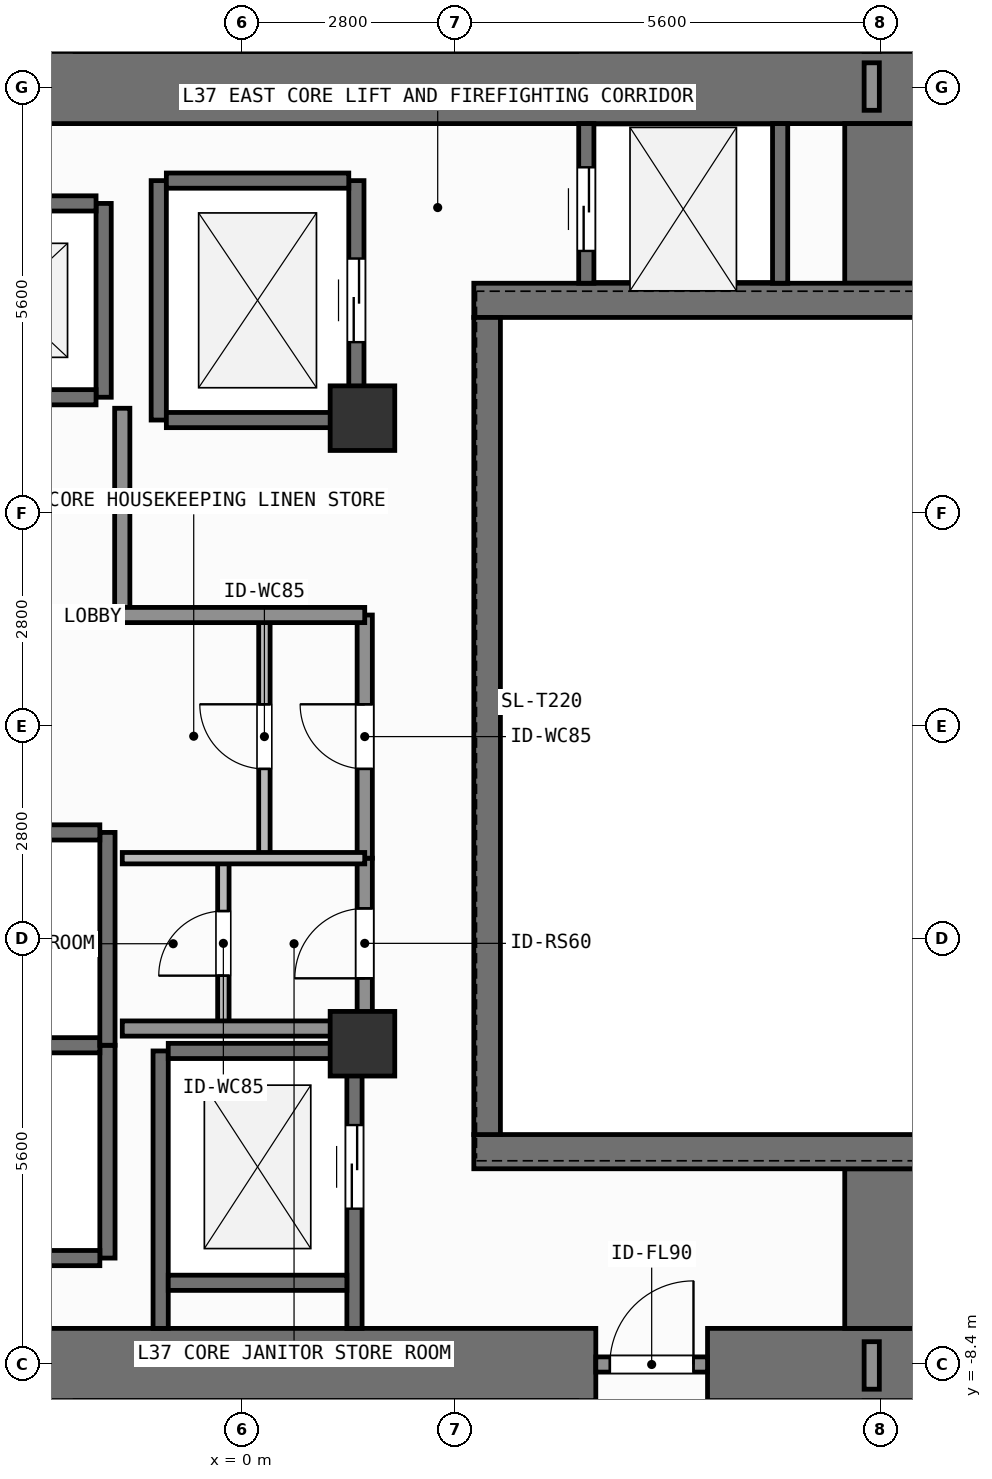
"""IFC4 building model, lengths in metres.
Left out: names, types, materials, properties, quantities, classifications, styles, units other than length and angle.
Written with IfcOpenShell. Run it as: python <this file> out.ifc"""

import sys

from ifc_helpers import new_model, si_unit, direction, frame, frame_2d, origin, origin_2d, place, context, subcontext, project, spatial, rectangle, extrude, element, fill, save


model = new_model("IFC4")
c1 = context("Model", 3, precision=1e-05, world=origin(), true_north=direction((0.0, 1.0)))
c2 = subcontext(c1, "Body", "Model", "MODEL_VIEW")
j1 = project(units=[si_unit("LENGTHUNIT", "METRE"), si_unit("PLANEANGLEUNIT", "RADIAN")], contexts=[c1])
p1 = place(None, origin())
s1 = spatial("IfcSite", under=j1, at=p1, CompositionType="ELEMENT")
p2 = place(p1, origin())
s2 = spatial("IfcBuilding", under=s1, at=p2, CompositionType="ELEMENT")
p3 = place(p2, frame((0.0, 0.0, 148.5)))
s3 = spatial("IfcBuildingStorey", under=s2, at=p3, CompositionType="ELEMENT", Elevation=148.5)
p4 = place(p3, frame((-2.62, -8.4, 0.0), z_axis=(0.0, 0.0, 1.0), x_axis=(1.0, 0.0, 0.0)))
e1 = element("IfcWall", 1, at=p4, inside=s3, PredefinedType="SHEAR", context=c2, shape_type="SweptSolid", body=[
    extrude(rectangle(XDim=7.27, YDim=0.95, at=frame_2d((3.635, 0.0))), origin(), (0.0, 0.0, 1.0), 3.9),
])
p5 = place(p3, frame((6.12, -8.4, 0.0), z_axis=(0.0, 0.0, 1.0), x_axis=(1.0, 0.0, 0.0)))
e2 = element("IfcWall", 2, at=p5, inside=s3, PredefinedType="SHEAR", context=c2, shape_type="SweptSolid", body=[
    extrude(rectangle(XDim=2.755, YDim=0.95, at=frame_2d((1.377, 0.0))), origin(), (0.0, 0.0, 1.0), 3.9),
])
p6 = place(p3, frame((-7.55, 8.4, 0.0), z_axis=(0.0, 0.0, 1.0), x_axis=(1.0, 0.0, 0.0)))
e3 = element("IfcWall", 3, at=p6, inside=s3, PredefinedType="SHEAR", context=c2, shape_type="SweptSolid", body=[
    extrude(rectangle(XDim=16.425, YDim=0.95, at=frame_2d((8.212, 0.0))), origin(), (0.0, 0.0, 1.0), 3.9),
])
for number, where, z_axis, x_axis in (
    (4, (8.4, -7.925, 0.0), (0.0, 0.0, 1.0), (0.0, 1.0, 0.0)),
    (5, (8.4, 5.825, 0.0), (0.0, 0.0, 1.0), (0.0, 1.0, 0.0)),
):
    element("IfcWall", number, at=place(p3, frame(where, z_axis=z_axis, x_axis=x_axis)), inside=s3, PredefinedType="SHEAR", context=c2, shape_type="SweptSolid", body=[
        extrude(rectangle(XDim=2.1, YDim=0.95, at=frame_2d((1.05, 0.0))), origin(), (0.0, 0.0, 1.0), 3.9),
    ])
for number, where, z_axis, x_axis in (
    (6, (3.045, -5.6, 0.0), (0.0, 0.0, 1.0), (1.0, 0.0, 0.0)),
    (7, (3.045, 5.6, 0.0), (0.0, 0.0, 1.0), (1.0, 0.0, 0.0)),
):
    element("IfcWall", number, at=place(p3, frame(where, z_axis=z_axis, x_axis=x_axis)), inside=s3, PredefinedType="SHEAR", context=c2, shape_type="SweptSolid", body=[
        extrude(rectangle(XDim=5.83, YDim=0.45, at=frame_2d((2.915, 0.0))), origin(), (0.0, 0.0, 1.0), 3.9),
    ])
p7 = place(p3, frame((3.22, -5.375, 0.0), z_axis=(0.0, 0.0, 1.0), x_axis=(0.0, 1.0, 0.0)))
e8 = element("IfcWall", 8, at=p7, inside=s3, PredefinedType="SHEAR", context=c2, shape_type="SweptSolid", body=[
    extrude(rectangle(XDim=10.75, YDim=0.35, at=frame_2d((5.375, 0.0))), origin(), (0.0, 0.0, 1.0), 3.9),
])
for number, where, z_axis, x_axis in (
    (9, (1.58, -4.18, 0.0), (0.0, 0.0, 1.0), (1.0, 0.0, 0.0)),
    (10, (1.58, 4.05, 0.0), (0.0, 0.0, 1.0), (1.0, 0.0, 0.0)),
):
    element("IfcColumn", number, at=place(p3, frame(where, z_axis=z_axis, x_axis=x_axis)), inside=s3, PredefinedType="COLUMN", context=c2, shape_type="SweptSolid", body=[
        extrude(rectangle(XDim=0.85, YDim=0.85, at=origin_2d()), origin(), (0.0, 0.0, 1.0), 3.9),
    ])
p8 = place(p3, frame((-1.825, 4.325, 0.0), z_axis=(0.0, 0.0, 1.0), x_axis=(0.0, 1.0, 0.0)))
e11 = element("IfcWall", 11, at=p8, inside=s3, PredefinedType="SHEAR", context=c2, shape_type="SweptSolid", body=[
    extrude(rectangle(XDim=2.55, YDim=0.2, at=frame_2d((1.275, 0.0))), origin(), (0.0, 0.0, 1.0), 3.68),
])
p9 = place(p3, frame((-4.275, 4.325, 0.0), z_axis=(0.0, 0.0, 1.0), x_axis=(1.0, 0.0, 0.0)))
e12 = element("IfcWall", 12, at=p9, inside=s3, PredefinedType="SHEAR", context=c2, shape_type="SweptSolid", body=[
    extrude(rectangle(XDim=2.35, YDim=0.2, at=frame_2d((1.175, 0.0))), origin(), (0.0, 0.0, 1.0), 3.68),
])
p10 = place(p9, frame((0.625, 0.0, 0.0)))
e13 = element("IfcOpeningElement", 13, at=p10, cuts=e12, PredefinedType="OPENING", context=c2, shape_type="SweptSolid", body=[
    extrude(rectangle(XDim=1.1, YDim=2.2, at=frame_2d((0.55, 1.1))), frame((0.0, 0.11, 0.0), z_axis=(0.0, -1.0, 0.0), x_axis=(1.0, 0.0, 0.0)), (0.0, 0.0, 1.0), 0.22),
])
p11 = place(p3, frame((-4.275, 6.875, 0.0), z_axis=(0.0, 0.0, 1.0), x_axis=(1.0, 0.0, 0.0)))
e14 = element("IfcWall", 14, at=p11, inside=s3, PredefinedType="SHEAR", context=c2, shape_type="SweptSolid", body=[
    extrude(rectangle(XDim=2.35, YDim=0.2, at=frame_2d((1.175, 0.0))), origin(), (0.0, 0.0, 1.0), 3.68),
])
p12 = place(p3, frame((-1.775, -7.0, 0.0), z_axis=(0.0, 0.0, 1.0), x_axis=(0.0, 1.0, 0.0)))
e15 = element("IfcWall", 15, at=p12, inside=s3, PredefinedType="SHEAR", context=c2, shape_type="SweptSolid", body=[
    extrude(rectangle(XDim=2.8, YDim=0.2, at=frame_2d((1.4, 0.0))), origin(), (0.0, 0.0, 1.0), 3.68),
])
for number, where, z_axis, x_axis in (
    (16, (-4.325, -7.0, 0.0), (0.0, 0.0, 1.0), (1.0, 0.0, 0.0)),
    (17, (-4.325, -4.2, 0.0), (0.0, 0.0, 1.0), (1.0, 0.0, 0.0)),
):
    element("IfcWall", number, at=place(p3, frame(where, z_axis=z_axis, x_axis=x_axis)), inside=s3, PredefinedType="SHEAR", context=c2, shape_type="SweptSolid", body=[
        extrude(rectangle(XDim=2.45, YDim=0.2, at=frame_2d((1.225, 0.0))), origin(), (0.0, 0.0, 1.0), 3.68),
    ])
p13 = place(p3, frame((-1.775, -4.2, 0.0), z_axis=(0.0, 0.0, 1.0), x_axis=(0.0, 1.0, 0.0)))
e18 = element("IfcWall", 18, at=p13, inside=s3, PredefinedType="SHEAR", context=c2, shape_type="SweptSolid", body=[
    extrude(rectangle(XDim=2.8, YDim=0.2, at=frame_2d((1.4, 0.0))), origin(), (0.0, 0.0, 1.0), 3.68),
])
p14 = place(p3, frame((-4.325, -1.4, 0.0), z_axis=(0.0, 0.0, 1.0), x_axis=(1.0, 0.0, 0.0)))
e19 = element("IfcWall", 19, at=p14, inside=s3, PredefinedType="SHEAR", context=c2, shape_type="SweptSolid", body=[
    extrude(rectangle(XDim=2.45, YDim=0.2, at=frame_2d((1.225, 0.0))), origin(), (0.0, 0.0, 1.0), 3.68),
])
p15 = place(p3, frame((-1.1, 4.025, 0.0), z_axis=(0.0, 0.0, 1.0), x_axis=(0.0, 1.0, 0.0)))
e20 = element("IfcWall", 20, at=p15, inside=s3, PredefinedType="SHEAR", context=c2, shape_type="SweptSolid", body=[
    extrude(rectangle(XDim=3.15, YDim=0.2, at=frame_2d((1.575, 0.0))), origin(), (0.0, 0.0, 1.0), 3.68),
])
p16 = place(p3, frame((1.5, 4.025, 0.0), z_axis=(0.0, 0.0, 1.0), x_axis=(0.0, 1.0, 0.0)))
e21 = element("IfcWall", 21, at=p16, inside=s3, PredefinedType="SHEAR", context=c2, shape_type="SweptSolid", body=[
    extrude(rectangle(XDim=3.15, YDim=0.2, at=frame_2d((1.575, 0.0))), origin(), (0.0, 0.0, 1.0), 3.68),
])
p17 = place(p16, frame((1.025, 0.0, 0.0)))
e22 = element("IfcOpeningElement", 22, at=p17, cuts=e21, PredefinedType="OPENING", context=c2, shape_type="SweptSolid", body=[
    extrude(rectangle(XDim=1.1, YDim=2.2, at=frame_2d((0.55, 1.1))), frame((0.0, 0.11, 0.0), z_axis=(0.0, -1.0, 0.0), x_axis=(1.0, 0.0, 0.0)), (0.0, 0.0, 1.0), 0.22),
])
for number, where, z_axis, x_axis in (
    (23, (-1.0, 4.025, 0.0), (0.0, 0.0, 1.0), (1.0, 0.0, 0.0)),
    (24, (-1.0, 7.175, 0.0), (0.0, 0.0, 1.0), (1.0, 0.0, 0.0)),
):
    element("IfcWall", number, at=place(p3, frame(where, z_axis=z_axis, x_axis=x_axis)), inside=s3, PredefinedType="SHEAR", context=c2, shape_type="SweptSolid", body=[
        extrude(rectangle(XDim=2.4, YDim=0.2, at=frame_2d((1.2, 0.0))), origin(), (0.0, 0.0, 1.0), 3.68),
    ])
p18 = place(p3, frame((-1.075, -7.925, 0.0), z_axis=(0.0, 0.0, 1.0), x_axis=(0.0, 1.0, 0.0)))
e25 = element("IfcWall", 25, at=p18, inside=s3, PredefinedType="SHEAR", context=c2, shape_type="SweptSolid", body=[
    extrude(rectangle(XDim=3.65, YDim=0.2, at=frame_2d((1.825, 0.0))), origin(), (0.0, 0.0, 1.0), 3.68),
])
p19 = place(p3, frame((1.475, -7.925, 0.0), z_axis=(0.0, 0.0, 1.0), x_axis=(0.0, 1.0, 0.0)))
e26 = element("IfcWall", 26, at=p19, inside=s3, PredefinedType="SHEAR", context=c2, shape_type="SweptSolid", body=[
    extrude(rectangle(XDim=3.65, YDim=0.2, at=frame_2d((1.825, 0.0))), origin(), (0.0, 0.0, 1.0), 3.68),
])
p20 = place(p19, frame((1.575, 0.0, 0.0)))
e27 = element("IfcOpeningElement", 27, at=p20, cuts=e26, PredefinedType="OPENING", context=c2, shape_type="SweptSolid", body=[
    extrude(rectangle(XDim=1.1, YDim=2.2, at=frame_2d((0.55, 1.1))), frame((0.0, 0.11, 0.0), z_axis=(0.0, -1.0, 0.0), x_axis=(1.0, 0.0, 0.0)), (0.0, 0.0, 1.0), 0.22),
])
for number, where, z_axis, x_axis in (
    (28, (-0.975, -7.325, 0.0), (0.0, 0.0, 1.0), (1.0, 0.0, 0.0)),
    (29, (-0.975, -4.275, 0.0), (0.0, 0.0, 1.0), (1.0, 0.0, 0.0)),
):
    element("IfcWall", number, at=place(p3, frame(where, z_axis=z_axis, x_axis=x_axis)), inside=s3, PredefinedType="SHEAR", context=c2, shape_type="SweptSolid", body=[
        extrude(rectangle(XDim=2.35, YDim=0.2, at=frame_2d((1.175, 0.0))), origin(), (0.0, 0.0, 1.0), 3.68),
    ])
p21 = place(p3, frame((4.525, 5.825, 0.0), z_axis=(0.0, 0.0, 1.0), x_axis=(0.0, 1.0, 0.0)))
e30 = element("IfcWall", 30, at=p21, inside=s3, PredefinedType="SHEAR", context=c2, shape_type="SweptSolid", body=[
    extrude(rectangle(XDim=2.1, YDim=0.2, at=frame_2d((1.05, 0.0))), origin(), (0.0, 0.0, 1.0), 3.68),
])
p22 = place(p21, frame((0.425, 0.0, 0.0)))
e31 = element("IfcOpeningElement", 31, at=p22, cuts=e30, PredefinedType="OPENING", context=c2, shape_type="SweptSolid", body=[
    extrude(rectangle(XDim=1.1, YDim=2.2, at=frame_2d((0.55, 1.1))), frame((0.0, 0.11, 0.0), z_axis=(0.0, -1.0, 0.0), x_axis=(1.0, 0.0, 0.0)), (0.0, 0.0, 1.0), 0.22),
])
p23 = place(p3, frame((7.075, 5.825, 0.0), z_axis=(0.0, 0.0, 1.0), x_axis=(0.0, 1.0, 0.0)))
e32 = element("IfcWall", 32, at=p23, inside=s3, PredefinedType="SHEAR", context=c2, shape_type="SweptSolid", body=[
    extrude(rectangle(XDim=2.1, YDim=0.2, at=frame_2d((1.05, 0.0))), origin(), (0.0, 0.0, 1.0), 3.68),
])
p24 = place(p3, frame((4.65, -8.4, 0.0), z_axis=(0.0, 0.0, 1.0), x_axis=(1.0, 0.0, 0.0)))
e33 = element("IfcWall", 33, at=p24, inside=s3, PredefinedType="SOLIDWALL", context=c2, shape_type="SweptSolid", body=[
    extrude(rectangle(XDim=1.47, YDim=0.2, at=frame_2d((0.735, 0.0))), origin(), (0.0, 0.0, 1.0), 2.72),
])
p25 = place(p24, frame((0.185, 0.0, 0.0)))
e34 = element("IfcOpeningElement", 34, at=p25, cuts=e33, PredefinedType="OPENING", context=c2, shape_type="SweptSolid", body=[
    extrude(rectangle(XDim=1.1, YDim=2.15, at=frame_2d((0.55, 1.075))), frame((0.0, 0.11, 0.0), z_axis=(0.0, -1.0, 0.0), x_axis=(1.0, 0.0, 0.0)), (0.0, 0.0, 1.0), 0.22),
])
p26 = place(p3, frame((-0.25, -3.98, 0.0), z_axis=(0.0, 0.0, 1.0), x_axis=(0.0, 1.0, 0.0)))
e35 = element("IfcWall", 35, at=p26, inside=s3, PredefinedType="PARTITIONING", context=c2, shape_type="SweptSolid", body=[
    extrude(rectangle(XDim=2.241, YDim=0.15, at=frame_2d((1.121, 0.0))), origin(), (0.0, 0.0, 1.0), 3.68),
])
p27 = place(p26, frame((0.696, 0.0, 0.0)))
e36 = element("IfcOpeningElement", 36, at=p27, cuts=e35, PredefinedType="OPENING", context=c2, shape_type="SweptSolid", body=[
    extrude(rectangle(XDim=0.85, YDim=2.1, at=frame_2d((0.425, 1.05))), frame((0.0, 0.085, 0.0), z_axis=(0.0, -1.0, 0.0), x_axis=(1.0, 0.0, 0.0)), (0.0, 0.0, 1.0), 0.17),
])
p28 = place(p3, frame((0.29, -1.739, 0.0), z_axis=(0.0, 0.0, 1.0), x_axis=(0.0, 1.0, 0.0)))
e37 = element("IfcWall", 37, at=p28, inside=s3, PredefinedType="PARTITIONING", context=c2, shape_type="SweptSolid", body=[
    extrude(rectangle(XDim=3.199, YDim=0.15, at=frame_2d((1.6, 0.0))), origin(), (0.0, 0.0, 1.0), 3.68),
])
p29 = place(p28, frame((1.175, 0.0, 0.0)))
e38 = element("IfcOpeningElement", 38, at=p29, cuts=e37, PredefinedType="OPENING", context=c2, shape_type="SweptSolid", body=[
    extrude(rectangle(XDim=0.85, YDim=2.1, at=frame_2d((0.425, 1.05))), frame((0.0, 0.085, 0.0), z_axis=(0.0, -1.0, 0.0), x_axis=(1.0, 0.0, 0.0)), (0.0, 0.0, 1.0), 0.17),
])
p30 = place(p3, frame((1.61, -3.98, 0.0), z_axis=(0.0, 0.0, 1.0), x_axis=(0.0, 1.0, 0.0)))
e39 = element("IfcWall", 39, at=p30, inside=s3, PredefinedType="SOLIDWALL", context=c2, shape_type="SweptSolid", body=[
    extrude(rectangle(XDim=2.241, YDim=0.2, at=frame_2d((1.121, 0.0))), origin(), (0.0, 0.0, 1.0), 3.68),
])
p31 = place(p30, frame((0.66, 0.0, 0.0)))
e40 = element("IfcOpeningElement", 40, at=p31, cuts=e39, PredefinedType="OPENING", context=c2, shape_type="SweptSolid", body=[
    extrude(rectangle(XDim=0.92, YDim=2.1, at=frame_2d((0.46, 1.05))), frame((0.0, 0.11, 0.0), z_axis=(0.0, -1.0, 0.0), x_axis=(1.0, 0.0, 0.0)), (0.0, 0.0, 1.0), 0.22),
])
p32 = place(p3, frame((1.61, -1.739, 0.0), z_axis=(0.0, 0.0, 1.0), x_axis=(0.0, 1.0, 0.0)))
e41 = element("IfcWall", 41, at=p32, inside=s3, PredefinedType="SOLIDWALL", context=c2, shape_type="SweptSolid", body=[
    extrude(rectangle(XDim=3.199, YDim=0.2, at=frame_2d((1.6, 0.0))), origin(), (0.0, 0.0, 1.0), 3.68),
])
p33 = place(p32, frame((1.175, 0.0, 0.0)))
e42 = element("IfcOpeningElement", 42, at=p33, cuts=e41, PredefinedType="OPENING", context=c2, shape_type="SweptSolid", body=[
    extrude(rectangle(XDim=0.85, YDim=2.1, at=frame_2d((0.425, 1.05))), frame((0.0, 0.11, 0.0), z_axis=(0.0, -1.0, 0.0), x_axis=(1.0, 0.0, 0.0)), (0.0, 0.0, 1.0), 0.22),
])
p34 = place(p3, frame((-1.58, 1.48, 0.0), z_axis=(0.0, 0.0, 1.0), x_axis=(0.0, 1.0, 0.0)))
e43 = element("IfcWall", 43, at=p34, inside=s3, PredefinedType="SOLIDWALL", context=c2, shape_type="SweptSolid", body=[
    extrude(rectangle(XDim=2.7, YDim=0.2, at=frame_2d((1.35, 0.0))), origin(), (0.0, 0.0, 1.0), 3.68),
])
for number, where, z_axis, x_axis in (
    (44, (-1.58, -3.98, 0.0), (0.0, 0.0, 1.0), (1.0, 0.0, 0.0)),
    (45, (-1.58, 1.46, 0.0), (0.0, 0.0, 1.0), (1.0, 0.0, 0.0)),
):
    element("IfcWall", number, at=place(p3, frame(where, z_axis=z_axis, x_axis=x_axis)), inside=s3, PredefinedType="SOLIDWALL", context=c2, shape_type="SweptSolid", body=[
        extrude(rectangle(XDim=3.19, YDim=0.2, at=frame_2d((1.595, 0.0))), origin(), (0.0, 0.0, 1.0), 3.68),
    ])
p35 = place(p3, frame((-1.58, -1.739, 0.0), z_axis=(0.0, 0.0, 1.0), x_axis=(1.0, 0.0, 0.0)))
e46 = element("IfcWall", 46, at=p35, inside=s3, PredefinedType="PARTITIONING", context=c2, shape_type="SweptSolid", body=[
    extrude(rectangle(XDim=3.19, YDim=0.15, at=frame_2d((1.595, 0.0))), origin(), (0.0, 0.0, 1.0), 3.68),
])
for number, where, z_axis, x_axis in (
    (47, (8.28, -8.725, 0.0), (0.0, 0.0, 1.0), (0.0, 1.0, 0.0)),
    (48, (8.28, 8.1, 0.0), (0.0, 0.0, 1.0), (0.0, 1.0, 0.0)),
):
    element("IfcWall", number, at=place(p3, frame(where, z_axis=z_axis, x_axis=x_axis)), inside=s3, PredefinedType="SOLIDWALL", context=c2, shape_type="SweptSolid", body=[
        extrude(rectangle(XDim=0.625, YDim=0.2, at=frame_2d((0.312, 0.0))), origin(), (0.0, 0.0, 1.0), 3.68),
    ])
p36 = place(p17, origin())
e49 = element("IfcDoor", 49, at=p36, inside=s3, OperationType="SLIDING_TO_LEFT", PredefinedType="DOOR", context=c2, shape_type="SweptSolid", body=[
    extrude(rectangle(XDim=1.1, YDim=2.2, at=frame_2d((0.55, 1.1))), frame((0.0, 0.025, 0.0), z_axis=(0.0, -1.0, 0.0), x_axis=(1.0, 0.0, 0.0)), (0.0, 0.0, 1.0), 0.05),
])
fill(e22, e49)
p37 = place(p20, origin())
e50 = element("IfcDoor", 50, at=p37, inside=s3, OperationType="SLIDING_TO_LEFT", PredefinedType="DOOR", context=c2, shape_type="SweptSolid", body=[
    extrude(rectangle(XDim=1.1, YDim=2.2, at=frame_2d((0.55, 1.1))), frame((0.0, 0.025, 0.0), z_axis=(0.0, -1.0, 0.0), x_axis=(1.0, 0.0, 0.0)), (0.0, 0.0, 1.0), 0.05),
])
fill(e27, e50)
p38 = place(p22, origin())
e51 = element("IfcDoor", 51, at=p38, inside=s3, OperationType="SLIDING_TO_LEFT", PredefinedType="DOOR", context=c2, shape_type="SweptSolid", body=[
    extrude(rectangle(XDim=1.1, YDim=2.2, at=frame_2d((0.55, 1.1))), frame((0.0, 0.025, 0.0), z_axis=(0.0, -1.0, 0.0), x_axis=(1.0, 0.0, 0.0)), (0.0, 0.0, 1.0), 0.05),
])
fill(e31, e51)
p39 = place(p25, origin())
e52 = element("IfcDoor", 52, at=p39, inside=s3, OperationType="SINGLE_SWING_RIGHT", PredefinedType="DOOR", context=c2, shape_type="SweptSolid", body=[
    extrude(rectangle(XDim=1.1, YDim=2.15, at=frame_2d((0.55, 1.075))), frame((0.0, 0.025, 0.0), z_axis=(0.0, -1.0, 0.0), x_axis=(1.0, 0.0, 0.0)), (0.0, 0.0, 1.0), 0.05),
])
fill(e34, e52)
p40 = place(p27, origin())
e53 = element("IfcDoor", 53, at=p40, inside=s3, OperationType="SINGLE_SWING_LEFT", PredefinedType="DOOR", context=c2, shape_type="SweptSolid", body=[
    extrude(rectangle(XDim=0.85, YDim=2.1, at=frame_2d((0.425, 1.05))), frame((0.0, 0.025, 0.0), z_axis=(0.0, -1.0, 0.0), x_axis=(1.0, 0.0, 0.0)), (0.0, 0.0, 1.0), 0.05),
])
fill(e36, e53)
p41 = place(p29, origin())
e54 = element("IfcDoor", 54, at=p41, inside=s3, OperationType="SINGLE_SWING_RIGHT", PredefinedType="DOOR", context=c2, shape_type="SweptSolid", body=[
    extrude(rectangle(XDim=0.85, YDim=2.1, at=frame_2d((0.425, 1.05))), frame((0.0, 0.025, 0.0), z_axis=(0.0, -1.0, 0.0), x_axis=(1.0, 0.0, 0.0)), (0.0, 0.0, 1.0), 0.05),
])
fill(e38, e54)
p42 = place(p31, origin())
e55 = element("IfcDoor", 55, at=p42, inside=s3, OperationType="SINGLE_SWING_LEFT", PredefinedType="DOOR", context=c2, shape_type="SweptSolid", body=[
    extrude(rectangle(XDim=0.92, YDim=2.1, at=frame_2d((0.46, 1.05))), frame((0.0, 0.025, 0.0), z_axis=(0.0, -1.0, 0.0), x_axis=(1.0, 0.0, 0.0)), (0.0, 0.0, 1.0), 0.05),
])
fill(e40, e55)
p43 = place(p33, origin())
e56 = element("IfcDoor", 56, at=p43, inside=s3, OperationType="SINGLE_SWING_RIGHT", PredefinedType="DOOR", context=c2, shape_type="SweptSolid", body=[
    extrude(rectangle(XDim=0.85, YDim=2.1, at=frame_2d((0.425, 1.05))), frame((0.0, 0.025, 0.0), z_axis=(0.0, -1.0, 0.0), x_axis=(1.0, 0.0, 0.0)), (0.0, 0.0, 1.0), 0.05),
])
fill(e42, e56)
save(model, sys.argv[1])
